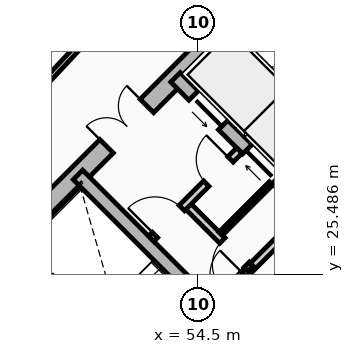
"""IFC4 building model, lengths in metres.
Left out: names, types, materials, properties, quantities, classifications, styles, units other than length and angle.
Written with IfcOpenShell. Run it as: python <this file> out.ifc"""

import sys

from ifc_helpers import new_model, si_unit, direction, frame, frame_2d, origin, place, context, subcontext, project, spatial, rectangle, extrude, source, transform, mapped, element, fill, save


model = new_model("IFC4")
c1 = context("Model", 3, precision=1e-05, world=origin(), true_north=direction((0.0, 1.0)))
c2 = subcontext(c1, "Body", "Model", "MODEL_VIEW")
j1 = project(units=[si_unit("LENGTHUNIT", "METRE"), si_unit("PLANEANGLEUNIT", "RADIAN")], contexts=[c1])
p1 = place(None, origin())
s1 = spatial("IfcSite", under=j1, at=p1, CompositionType="ELEMENT")
p2 = place(p1, origin())
s2 = spatial("IfcBuilding", under=s1, at=p2, CompositionType="ELEMENT")
p3 = place(p2, frame((0.0, 0.0, 51.1)))
s3 = spatial("IfcBuildingStorey", under=s2, at=p3, CompositionType="ELEMENT", Elevation=51.1)
for number, where, z_axis, x_axis in (
    (1, (58.773, 15.661, 0.0), (0.0, 0.0, 1.0), (-0.707, 0.707, 0.0)),
    (2, (66.339, 23.227, 0.0), (0.0, 0.0, 1.0), (-0.707, 0.707, 0.0)),
):
    element("IfcWall", number, at=place(p3, frame(where, z_axis=z_axis, x_axis=x_axis)), inside=s3, PredefinedType="SHEAR", context=c2, shape_type="SweptSolid", body=[
        extrude(rectangle(XDim=14.3, YDim=0.5, at=frame_2d((7.15, 0.0))), origin(), (0.0, 0.0, 1.0), 2.91),
    ])
p4 = place(p3, frame((48.838, 25.596, 0.0), z_axis=(0.0, 0.0, 1.0), x_axis=(0.707106781187, 0.707106781187, 0.0)))
e3 = element("IfcWall", 3, at=p4, inside=s3, PredefinedType="SHEAR", context=c2, shape_type="SweptSolid", body=[
    extrude(rectangle(XDim=10.7, YDim=0.5, at=frame_2d((5.35, 0.0))), origin(), (0.0, 0.0, 1.0), 2.91),
])
m1 = source(origin(), c2, "Body", "SweptSolid", [
    extrude(rectangle(XDim=1.5, YDim=2.02, at=frame_2d((0.75, 1.01))), frame((0.0, 0.26, 0.0), z_axis=(0.0, -1.0, 0.0), x_axis=(1.0, 0.0, 0.0)), (0.0, 0.0, 1.0), 0.52),
])
p5 = place(p4, frame((4.6, 0.0, 0.0)))
e4 = element("IfcOpeningElement", 4, at=p5, cuts=e3, PredefinedType="OPENING", context=c2, shape_type="MappedRepresentation", body=[
    mapped(m1, transform((0.0, 0.0, 0.0), x_axis=(1.0, 0.0, 0.0), y_axis=(0.0, 1.0, 0.0), z_axis=(0.0, 0.0, 1.0), scale=1.0)),
])
p6 = place(p3, frame((61.096, 18.338, 0.0), z_axis=(0.0, 0.0, 1.0), x_axis=(-0.707106781187, 0.707106781187, 0.0)))
e5 = element("IfcWall", 5, at=p6, inside=s3, PredefinedType="SHEAR", context=c2, shape_type="SweptSolid", body=[
    extrude(rectangle(XDim=13.8, YDim=0.35, at=frame_2d((6.9, 0.0))), origin(), (0.0, 0.0, 1.0), 2.91),
])
m2 = source(origin(), c2, "Body", "SweptSolid", [
    extrude(rectangle(XDim=1.1, YDim=2.015, at=frame_2d((0.55, 1.007))), frame((0.0, 0.185, 0.0), z_axis=(0.0, -1.0, 0.0), x_axis=(1.0, 0.0, 0.0)), (0.0, 0.0, 1.0), 0.37),
])
p7 = place(p6, frame((4.9, 0.0, 0.0)))
e6 = element("IfcOpeningElement", 6, at=p7, cuts=e5, PredefinedType="OPENING", context=c2, shape_type="MappedRepresentation", body=[
    mapped(m2, transform((0.0, 0.0, 0.0), x_axis=(1.0, 0.0, 0.0), y_axis=(0.0, 1.0, 0.0), z_axis=(0.0, 0.0, 1.0), scale=1.0)),
])
m3 = source(origin(), c2, "Body", "SweptSolid", [
    extrude(rectangle(XDim=1.15, YDim=2.02, at=frame_2d((0.575, 1.01))), frame((0.0, 0.185, 0.0), z_axis=(0.0, -1.0, 0.0), x_axis=(1.0, 0.0, 0.0)), (0.0, 0.0, 1.0), 0.37),
])
p8 = place(p6, frame((7.32, 0.0, 0.0)))
e7 = element("IfcOpeningElement", 7, at=p8, cuts=e5, PredefinedType="OPENING", context=c2, shape_type="MappedRepresentation", body=[
    mapped(m3, transform((0.0, 0.0, 0.0), x_axis=(1.0, 0.0, 0.0), y_axis=(0.0, 1.0, 0.0), z_axis=(0.0, 0.0, 1.0), scale=1.0)),
])
p9 = place(p3, frame((63.662, 20.904, 0.0), z_axis=(0.0, 0.0, 1.0), x_axis=(-0.707106781187, 0.707106781187, 0.0)))
e8 = element("IfcWall", 8, at=p9, inside=s3, PredefinedType="SHEAR", context=c2, shape_type="SweptSolid", body=[
    extrude(rectangle(XDim=13.8, YDim=0.35, at=frame_2d((6.9, 0.0))), origin(), (0.0, 0.0, 1.0), 2.91),
])
p10 = place(p9, frame((10.025, 0.0, 0.0)))
e9 = element("IfcOpeningElement", 9, at=p10, cuts=e8, PredefinedType="OPENING", context=c2, shape_type="MappedRepresentation", body=[
    mapped(m2, transform((0.0, 0.0, 0.0), x_axis=(1.0, 0.0, 0.0), y_axis=(0.0, 1.0, 0.0), z_axis=(0.0, 0.0, 1.0), scale=1.0)),
])
p11 = place(p9, frame((12.025, 0.0, 0.0)))
e10 = element("IfcOpeningElement", 10, at=p11, cuts=e8, PredefinedType="OPENING", context=c2, shape_type="MappedRepresentation", body=[
    mapped(m2, transform((0.0, 0.0, 0.0), x_axis=(1.0, 0.0, 0.0), y_axis=(0.0, 1.0, 0.0), z_axis=(0.0, 0.0, 1.0), scale=1.0)),
])
p12 = place(p9, frame((5.33, 0.0, 0.0)))
e11 = element("IfcOpeningElement", 11, at=p12, cuts=e8, PredefinedType="OPENING", context=c2, shape_type="MappedRepresentation", body=[
    mapped(m3, transform((0.0, 0.0, 0.0), x_axis=(1.0, 0.0, 0.0), y_axis=(0.0, 1.0, 0.0), z_axis=(0.0, 0.0, 1.0), scale=1.0)),
])
p13 = place(p3, frame((53.922, 21.141, 0.0), z_axis=(0.0, 0.0, 1.0), x_axis=(-0.707106781187, 0.707106781187, 0.0)))
e12 = element("IfcWall", 12, at=p13, inside=s3, PredefinedType="SHEAR", context=c2, shape_type="SweptSolid", body=[
    extrude(rectangle(XDim=6.745, YDim=0.35, at=frame_2d((3.373, 0.0))), origin(), (0.0, 0.0, 1.0), 2.91),
])
p14 = place(p3, frame((55.615, 29.227, 0.0), z_axis=(0.0, 0.0, 1.0), x_axis=(0.707147878904, 0.70706568108, 0.0)))
e13 = element("IfcWall", 13, at=p14, inside=s3, PredefinedType="SHEAR", context=c2, shape_type="SweptSolid", body=[
    extrude(rectangle(XDim=2.97, YDim=0.2, at=frame_2d((1.485, 0.0))), origin(), (0.0, 0.0, 1.0), 2.91),
])
p15 = place(p3, frame((57.419, 31.2, 0.0), z_axis=(0.0, 0.0, 1.0), x_axis=(-0.707032117043, 0.707181437447, 0.0)))
e14 = element("IfcWall", 14, at=p15, inside=s3, PredefinedType="SHEAR", context=c2, shape_type="SweptSolid", body=[
    extrude(rectangle(XDim=1.635, YDim=0.2, at=frame_2d((0.817, 0.0))), origin(), (0.0, 0.0, 1.0), 2.91),
])
p16 = place(p3, frame((54.961, 24.719, 0.0), z_axis=(0.0, 0.0, 1.0), x_axis=(0.707106781187, 0.707106781187, 0.0)))
e15 = element("IfcWall", 15, at=p16, inside=s3, PredefinedType="PARTITIONING", context=c2, shape_type="SweptSolid", body=[
    extrude(rectangle(XDim=3.28, YDim=0.2, at=frame_2d((1.64, 0.0))), origin(), (0.0, 0.0, 1.0), 2.635),
])
m4 = source(origin(), c2, "Body", "SweptSolid", [
    extrude(rectangle(XDim=0.9, YDim=2.005, at=frame_2d((0.45, 1.002))), frame((0.0, 0.11, 0.0), z_axis=(0.0, -1.0, 0.0), x_axis=(1.0, 0.0, 0.0)), (0.0, 0.0, 1.0), 0.22),
])
p17 = place(p16, frame((0.16, 0.0, 0.0)))
e16 = element("IfcOpeningElement", 16, at=p17, cuts=e15, PredefinedType="OPENING", context=c2, shape_type="MappedRepresentation", body=[
    mapped(m4, transform((0.0, 0.0, 0.0), x_axis=(1.0, 0.0, 0.0), y_axis=(0.0, 1.0, 0.0), z_axis=(0.0, 0.0, 1.0), scale=1.0)),
])
p18 = place(p3, frame((55.874, 25.631, 0.0), z_axis=(0.0, 0.0, 1.0), x_axis=(-0.707157639372, 0.707055919343, 0.0)))
e17 = element("IfcWall", 17, at=p18, inside=s3, PredefinedType="PARTITIONING", context=c2, shape_type="SweptSolid", body=[
    extrude(rectangle(XDim=2.4, YDim=0.2, at=frame_2d((1.2, 0.0))), origin(), (0.0, 0.0, 1.0), 2.635),
])
p19 = place(p18, frame((0.14, 0.0, 0.0)))
e18 = element("IfcOpeningElement", 18, at=p19, cuts=e17, PredefinedType="OPENING", context=c2, shape_type="MappedRepresentation", body=[
    mapped(m4, transform((0.0, 0.0, 0.0), x_axis=(1.0, 0.0, 0.0), y_axis=(0.0, 1.0, 0.0), z_axis=(0.0, 0.0, 1.0), scale=1.0)),
])
p20 = place(p3, frame((53.264, 26.416, 0.0), z_axis=(0.0, 0.0, 1.0), x_axis=(0.707106781187, 0.707106781187, 0.0)))
e19 = element("IfcWall", 19, at=p20, inside=s3, PredefinedType="PARTITIONING", context=c2, shape_type="SweptSolid", body=[
    extrude(rectangle(XDim=3.28, YDim=0.2, at=frame_2d((1.64, 0.0))), origin(), (0.0, 0.0, 1.0), 2.635),
])
m5 = source(origin(), c2, "Body", "SweptSolid", [
    extrude(rectangle(XDim=1.0, YDim=2.015, at=frame_2d((0.5, 1.007))), frame((0.0, 0.11, 0.0), z_axis=(0.0, -1.0, 0.0), x_axis=(1.0, 0.0, 0.0)), (0.0, 0.0, 1.0), 0.22),
])
p21 = place(p20, frame((0.14, 0.0, 0.0)))
e20 = element("IfcOpeningElement", 20, at=p21, cuts=e19, PredefinedType="OPENING", context=c2, shape_type="MappedRepresentation", body=[
    mapped(m5, transform((0.0, 0.0, 0.0), x_axis=(1.0, 0.0, 0.0), y_axis=(0.0, 1.0, 0.0), z_axis=(0.0, 0.0, 1.0), scale=1.0)),
])
p22 = place(p20, frame((2.05, 0.0, 0.0)))
e21 = element("IfcOpeningElement", 21, at=p22, cuts=e19, PredefinedType="OPENING", context=c2, shape_type="MappedRepresentation", body=[
    mapped(m4, transform((0.0, 0.0, 0.0), x_axis=(1.0, 0.0, 0.0), y_axis=(0.0, 1.0, 0.0), z_axis=(0.0, 0.0, 1.0), scale=1.0)),
])
p23 = place(p3, frame((55.089, 26.543, 0.0), z_axis=(0.0, 0.0, 1.0), x_axis=(0.707106781187, 0.707106781187, 0.0)))
e22 = element("IfcWall", 22, at=p23, inside=s3, PredefinedType="PARTITIONING", context=c2, shape_type="SweptSolid", body=[
    extrude(rectangle(XDim=1.88, YDim=0.125, at=frame_2d((0.94, 0.0))), origin(), (0.0, 0.0, 1.0), 2.635),
])
p24 = place(p3, frame((52.079, 32.244, 0.0), z_axis=(0.0, 0.0, 1.0), x_axis=(-0.682703325574, -0.730695674854, 0.0)))
e23 = element("IfcWall", 23, at=p24, inside=s3, PredefinedType="PARTITIONING", context=c2, shape_type="SweptSolid", body=[
    extrude(rectangle(XDim=6.527, YDim=0.15, at=frame_2d((3.263, 0.0))), origin(), (0.0, 0.0, 1.0), 2.159),
])
m6 = source(origin(), c2, "Body", "SweptSolid", [
    extrude(rectangle(XDim=1.1, YDim=2.015, at=frame_2d((0.55, 1.007))), frame((0.0, 0.025, 0.0), z_axis=(0.0, -1.0, 0.0), x_axis=(1.0, 0.0, 0.0)), (0.0, 0.0, 1.0), 0.05),
])
p25 = place(p10, origin())
e24 = element("IfcDoor", 24, at=p25, inside=s3, OperationType="SLIDING_TO_RIGHT", PredefinedType="DOOR", context=c2, shape_type="MappedRepresentation", body=[
    mapped(m6, transform((0.0, 0.0, 0.0), x_axis=(1.0, 0.0, 0.0), y_axis=(0.0, 1.0, 0.0), z_axis=(0.0, 0.0, 1.0), scale=1.0)),
])
fill(e9, e24)
p26 = place(p11, origin())
e25 = element("IfcDoor", 25, at=p26, inside=s3, OperationType="SLIDING_TO_LEFT", PredefinedType="DOOR", context=c2, shape_type="MappedRepresentation", body=[
    mapped(m6, transform((0.0, 0.0, 0.0), x_axis=(1.0, 0.0, 0.0), y_axis=(0.0, 1.0, 0.0), z_axis=(0.0, 0.0, 1.0), scale=1.0)),
])
fill(e10, e25)
m7 = source(origin(), c2, "Body", "SweptSolid", [
    extrude(rectangle(XDim=1.5, YDim=2.02, at=frame_2d((0.75, 1.01))), frame((0.0, 0.025, 0.0), z_axis=(0.0, -1.0, 0.0), x_axis=(1.0, 0.0, 0.0)), (0.0, 0.0, 1.0), 0.05),
])
p27 = place(p5, origin())
e26 = element("IfcDoor", 26, at=p27, inside=s3, OperationType="DOUBLE_DOOR_SINGLE_SWING", PredefinedType="DOOR", context=c2, shape_type="MappedRepresentation", body=[
    mapped(m7, transform((0.0, 0.0, 0.0), x_axis=(1.0, 0.0, 0.0), y_axis=(0.0, 1.0, 0.0), z_axis=(0.0, 0.0, 1.0), scale=1.0)),
])
fill(e4, e26)
m8 = source(origin(), c2, "Body", "SweptSolid", [
    extrude(rectangle(XDim=0.9, YDim=2.005, at=frame_2d((0.45, 1.002))), frame((0.0, 0.025, 0.0), z_axis=(0.0, -1.0, 0.0), x_axis=(1.0, 0.0, 0.0)), (0.0, 0.0, 1.0), 0.05),
])
p28 = place(p17, origin())
e27 = element("IfcDoor", 27, at=p28, inside=s3, OperationType="SINGLE_SWING_RIGHT", PredefinedType="DOOR", context=c2, shape_type="MappedRepresentation", body=[
    mapped(m8, transform((0.0, 0.0, 0.0), x_axis=(1.0, 0.0, 0.0), y_axis=(0.0, 1.0, 0.0), z_axis=(0.0, 0.0, 1.0), scale=1.0)),
])
fill(e16, e27)
m9 = source(origin(), c2, "Body", "SweptSolid", [
    extrude(rectangle(XDim=1.0, YDim=2.015, at=frame_2d((0.5, 1.007))), frame((0.0, 0.025, 0.0), z_axis=(0.0, -1.0, 0.0), x_axis=(1.0, 0.0, 0.0)), (0.0, 0.0, 1.0), 0.05),
])
p29 = place(p21, origin())
e28 = element("IfcDoor", 28, at=p29, inside=s3, OperationType="SINGLE_SWING_LEFT", PredefinedType="DOOR", context=c2, shape_type="MappedRepresentation", body=[
    mapped(m9, transform((0.0, 0.0, 0.0), x_axis=(1.0, 0.0, 0.0), y_axis=(0.0, 1.0, 0.0), z_axis=(0.0, 0.0, 1.0), scale=1.0)),
])
fill(e20, e28)
p30 = place(p19, origin())
e29 = element("IfcDoor", 29, at=p30, inside=s3, OperationType="SINGLE_SWING_LEFT", PredefinedType="DOOR", context=c2, shape_type="MappedRepresentation", body=[
    mapped(m8, transform((0.0, 0.0, 0.0), x_axis=(1.0, 0.0, 0.0), y_axis=(0.0, 1.0, 0.0), z_axis=(0.0, 0.0, 1.0), scale=1.0)),
])
fill(e18, e29)
p31 = place(p22, origin())
e30 = element("IfcDoor", 30, at=p31, inside=s3, OperationType="SINGLE_SWING_RIGHT", PredefinedType="DOOR", context=c2, shape_type="MappedRepresentation", body=[
    mapped(m8, transform((0.0, 0.0, 0.0), x_axis=(1.0, 0.0, 0.0), y_axis=(0.0, 1.0, 0.0), z_axis=(0.0, 0.0, 1.0), scale=1.0)),
])
fill(e21, e30)
save(model, sys.argv[1])
